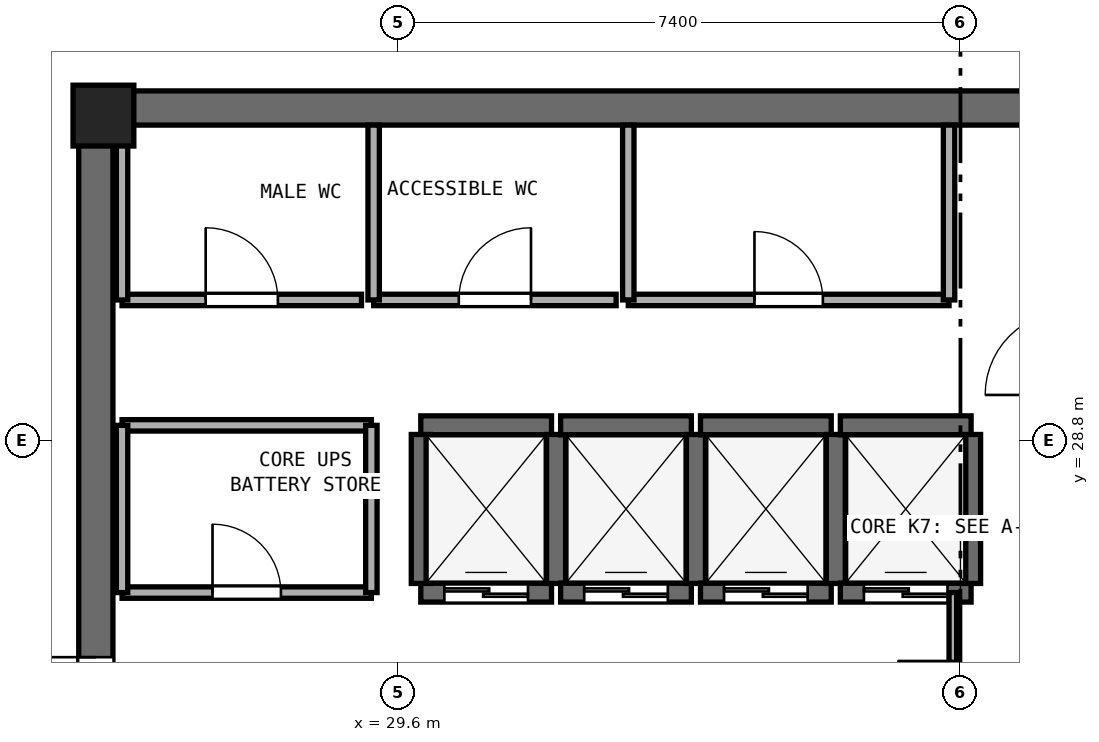
"""IFC4 building model, lengths in metres.
Left out: names, types, materials, properties, quantities, classifications, styles, units other than length and angle.
Written with IfcOpenShell. Run it as: python <this file> out.ifc"""

import sys

from ifc_helpers import new_model, si_unit, direction, frame, frame_2d, origin, origin_2d, place, context, subcontext, project, spatial, rectangle, extrude, element, fill, save


model = new_model("IFC4")
c1 = context("Model", 3, precision=1e-05, world=origin(), true_north=direction((0.0, 1.0)))
c2 = subcontext(c1, "Body", "Model", "MODEL_VIEW")
j1 = project(units=[si_unit("LENGTHUNIT", "METRE"), si_unit("PLANEANGLEUNIT", "RADIAN")], contexts=[c1])
p1 = place(None, origin())
s1 = spatial("IfcSite", under=j1, at=p1, CompositionType="ELEMENT")
p2 = place(p1, origin())
s2 = spatial("IfcBuilding", under=s1, at=p2, CompositionType="ELEMENT")
p3 = place(p2, frame((0.0, 0.0, 285.8)))
s3 = spatial("IfcBuildingStorey", under=s2, at=p3, CompositionType="ELEMENT", Elevation=285.8)
p4 = place(p3, frame((25.4, 33.175, 0.0), z_axis=(0.0, 0.0, 1.0), x_axis=(1.0, 0.0, 0.0)))
e1 = element("IfcWall", 1, at=p4, inside=s3, PredefinedType="SHEAR", context=c2, shape_type="SweptSolid", body=[
    extrude(rectangle(XDim=23.2, YDim=0.45, at=frame_2d((11.6, 0.0))), origin(), (0.0, 0.0, 1.0), 3.54),
])
p5 = place(p3, frame((25.625, 17.45, 0.0), z_axis=(0.0, 0.0, 1.0), x_axis=(0.0, 1.0, 0.0)))
e2 = element("IfcWall", 2, at=p5, inside=s3, PredefinedType="SHEAR", context=c2, shape_type="SweptSolid", body=[
    extrude(rectangle(XDim=15.5, YDim=0.45, at=frame_2d((7.75, 0.0))), origin(), (0.0, 0.0, 1.0), 3.54),
])
p6 = place(p5, frame((7.0, 0.0, 0.0)))
e3 = element("IfcOpeningElement", 3, at=p6, cuts=e2, PredefinedType="OPENING", context=c2, shape_type="SweptSolid", body=[
    extrude(rectangle(XDim=1.5, YDim=2.15, at=frame_2d((0.75, 1.075))), frame((0.0, 0.235, 0.0), z_axis=(0.0, -1.0, 0.0), x_axis=(1.0, 0.0, 0.0)), (0.0, 0.0, 1.0), 0.47),
])
p7 = place(p3, frame((25.725, 33.075, 0.0), z_axis=(0.0, 0.0, 1.0), x_axis=(1.0, 0.0, 0.0)))
e4 = element("IfcColumn", 4, at=p7, inside=s3, PredefinedType="PILASTER", context=c2, shape_type="SweptSolid", body=[
    extrude(rectangle(XDim=0.8, YDim=0.8, at=origin_2d()), origin(), (0.0, 0.0, 1.0), 3.8),
])
p8 = place(p3, frame((29.9, 26.8, 0.0), z_axis=(0.0, 0.0, 1.0), x_axis=(1.0, 0.0, 0.0)))
e5 = element("IfcWall", 5, at=p8, inside=s3, PredefinedType="SHEAR", context=c2, shape_type="SweptSolid", body=[
    extrude(rectangle(XDim=1.72, YDim=0.25, at=frame_2d((0.86, 0.0))), origin(), (0.0, 0.0, 1.0), 3.54),
])
p9 = place(p8, frame((0.31, 0.0, 0.0)))
e6 = element("IfcOpeningElement", 6, at=p9, cuts=e5, PredefinedType="OPENING", context=c2, shape_type="SweptSolid", body=[
    extrude(rectangle(XDim=1.1, YDim=2.15, at=frame_2d((0.55, 1.075))), frame((0.0, 0.135, 0.0), z_axis=(0.0, -1.0, 0.0), x_axis=(1.0, 0.0, 0.0)), (0.0, 0.0, 1.0), 0.27),
])
p10 = place(p3, frame((29.9, 29.0, 0.0), z_axis=(0.0, 0.0, 1.0), x_axis=(1.0, 0.0, 0.0)))
e7 = element("IfcWall", 7, at=p10, inside=s3, PredefinedType="SHEAR", context=c2, shape_type="SweptSolid", body=[
    extrude(rectangle(XDim=1.72, YDim=0.25, at=frame_2d((0.86, 0.0))), origin(), (0.0, 0.0, 1.0), 3.54),
])
for number, where, z_axis, x_axis in (
    (8, (29.9, 26.92, 0.0), (0.0, 0.0, 1.0), (0.0, 1.0, 0.0)),
    (9, (31.68, 26.92, 0.0), (0.0, 0.0, 1.0), (0.0, 1.0, 0.0)),
):
    element("IfcWall", number, at=place(p3, frame(where, z_axis=z_axis, x_axis=x_axis)), inside=s3, PredefinedType="SHEAR", context=c2, shape_type="SweptSolid", body=[
        extrude(rectangle(XDim=1.96, YDim=0.25, at=frame_2d((0.98, 0.0))), origin(), (0.0, 0.0, 1.0), 3.54),
    ])
p11 = place(p3, frame((31.74, 26.8, 0.0), z_axis=(0.0, 0.0, 1.0), x_axis=(1.0, 0.0, 0.0)))
e10 = element("IfcWall", 10, at=p11, inside=s3, PredefinedType="SHEAR", context=c2, shape_type="SweptSolid", body=[
    extrude(rectangle(XDim=1.72, YDim=0.25, at=frame_2d((0.86, 0.0))), origin(), (0.0, 0.0, 1.0), 3.54),
])
p12 = place(p11, frame((0.31, 0.0, 0.0)))
e11 = element("IfcOpeningElement", 11, at=p12, cuts=e10, PredefinedType="OPENING", context=c2, shape_type="SweptSolid", body=[
    extrude(rectangle(XDim=1.1, YDim=2.15, at=frame_2d((0.55, 1.075))), frame((0.0, 0.135, 0.0), z_axis=(0.0, -1.0, 0.0), x_axis=(1.0, 0.0, 0.0)), (0.0, 0.0, 1.0), 0.27),
])
p13 = place(p3, frame((31.74, 29.0, 0.0), z_axis=(0.0, 0.0, 1.0), x_axis=(1.0, 0.0, 0.0)))
e12 = element("IfcWall", 12, at=p13, inside=s3, PredefinedType="SHEAR", context=c2, shape_type="SweptSolid", body=[
    extrude(rectangle(XDim=1.72, YDim=0.25, at=frame_2d((0.86, 0.0))), origin(), (0.0, 0.0, 1.0), 3.54),
])
p14 = place(p3, frame((33.52, 26.92, 0.0), z_axis=(0.0, 0.0, 1.0), x_axis=(0.0, 1.0, 0.0)))
e13 = element("IfcWall", 13, at=p14, inside=s3, PredefinedType="SHEAR", context=c2, shape_type="SweptSolid", body=[
    extrude(rectangle(XDim=1.96, YDim=0.25, at=frame_2d((0.98, 0.0))), origin(), (0.0, 0.0, 1.0), 3.54),
])
p15 = place(p3, frame((33.58, 26.8, 0.0), z_axis=(0.0, 0.0, 1.0), x_axis=(1.0, 0.0, 0.0)))
e14 = element("IfcWall", 14, at=p15, inside=s3, PredefinedType="SHEAR", context=c2, shape_type="SweptSolid", body=[
    extrude(rectangle(XDim=1.72, YDim=0.25, at=frame_2d((0.86, 0.0))), origin(), (0.0, 0.0, 1.0), 3.54),
])
p16 = place(p15, frame((0.31, 0.0, 0.0)))
e15 = element("IfcOpeningElement", 15, at=p16, cuts=e14, PredefinedType="OPENING", context=c2, shape_type="SweptSolid", body=[
    extrude(rectangle(XDim=1.1, YDim=2.15, at=frame_2d((0.55, 1.075))), frame((0.0, 0.135, 0.0), z_axis=(0.0, -1.0, 0.0), x_axis=(1.0, 0.0, 0.0)), (0.0, 0.0, 1.0), 0.27),
])
p17 = place(p3, frame((33.58, 29.0, 0.0), z_axis=(0.0, 0.0, 1.0), x_axis=(1.0, 0.0, 0.0)))
e16 = element("IfcWall", 16, at=p17, inside=s3, PredefinedType="SHEAR", context=c2, shape_type="SweptSolid", body=[
    extrude(rectangle(XDim=1.72, YDim=0.25, at=frame_2d((0.86, 0.0))), origin(), (0.0, 0.0, 1.0), 3.54),
])
p18 = place(p3, frame((35.36, 26.92, 0.0), z_axis=(0.0, 0.0, 1.0), x_axis=(0.0, 1.0, 0.0)))
e17 = element("IfcWall", 17, at=p18, inside=s3, PredefinedType="SHEAR", context=c2, shape_type="SweptSolid", body=[
    extrude(rectangle(XDim=1.96, YDim=0.25, at=frame_2d((0.98, 0.0))), origin(), (0.0, 0.0, 1.0), 3.54),
])
p19 = place(p3, frame((35.42, 26.8, 0.0), z_axis=(0.0, 0.0, 1.0), x_axis=(1.0, 0.0, 0.0)))
e18 = element("IfcWall", 18, at=p19, inside=s3, PredefinedType="SHEAR", context=c2, shape_type="SweptSolid", body=[
    extrude(rectangle(XDim=1.72, YDim=0.25, at=frame_2d((0.86, 0.0))), origin(), (0.0, 0.0, 1.0), 3.54),
])
p20 = place(p19, frame((0.31, 0.0, 0.0)))
e19 = element("IfcOpeningElement", 19, at=p20, cuts=e18, PredefinedType="OPENING", context=c2, shape_type="SweptSolid", body=[
    extrude(rectangle(XDim=1.1, YDim=2.15, at=frame_2d((0.55, 1.075))), frame((0.0, 0.135, 0.0), z_axis=(0.0, -1.0, 0.0), x_axis=(1.0, 0.0, 0.0)), (0.0, 0.0, 1.0), 0.27),
])
p21 = place(p3, frame((35.42, 29.0, 0.0), z_axis=(0.0, 0.0, 1.0), x_axis=(1.0, 0.0, 0.0)))
e20 = element("IfcWall", 20, at=p21, inside=s3, PredefinedType="SHEAR", context=c2, shape_type="SweptSolid", body=[
    extrude(rectangle(XDim=1.72, YDim=0.25, at=frame_2d((0.86, 0.0))), origin(), (0.0, 0.0, 1.0), 3.54),
])
p22 = place(p3, frame((37.14, 26.92, 0.0), z_axis=(0.0, 0.0, 1.0), x_axis=(0.0, 1.0, 0.0)))
e21 = element("IfcWall", 21, at=p22, inside=s3, PredefinedType="SHEAR", context=c2, shape_type="SweptSolid", body=[
    extrude(rectangle(XDim=1.96, YDim=0.25, at=frame_2d((0.98, 0.0))), origin(), (0.0, 0.0, 1.0), 3.54),
])
p23 = place(p3, frame((25.97, 30.65, 0.0), z_axis=(0.0, 0.0, 1.0), x_axis=(1.0, 0.0, 0.0)))
e22 = element("IfcWall", 22, at=p23, inside=s3, PredefinedType="PARTITIONING", context=c2, shape_type="SweptSolid", body=[
    extrude(rectangle(XDim=3.15, YDim=0.15, at=frame_2d((1.575, 0.0))), origin(), (0.0, 0.0, 1.0), 3.54),
])
p24 = place(p23, frame((1.1, 0.0, 0.0)))
e23 = element("IfcOpeningElement", 23, at=p24, cuts=e22, PredefinedType="OPENING", context=c2, shape_type="SweptSolid", body=[
    extrude(rectangle(XDim=0.95, YDim=2.1, at=frame_2d((0.475, 1.05))), frame((0.0, 0.085, 0.0), z_axis=(0.0, -1.0, 0.0), x_axis=(1.0, 0.0, 0.0)), (0.0, 0.0, 1.0), 0.17),
])
p25 = place(p3, frame((25.97, 30.65, 0.0), z_axis=(0.0, 0.0, 1.0), x_axis=(0.0, 1.0, 0.0)))
e24 = element("IfcWall", 24, at=p25, inside=s3, PredefinedType="PARTITIONING", context=c2, shape_type="SweptSolid", body=[
    extrude(rectangle(XDim=2.3, YDim=0.15, at=frame_2d((1.15, 0.0))), origin(), (0.0, 0.0, 1.0), 2.64),
])
p26 = place(p3, frame((29.28, 30.65, 0.0), z_axis=(0.0, 0.0, 1.0), x_axis=(1.0, 0.0, 0.0)))
e25 = element("IfcWall", 25, at=p26, inside=s3, PredefinedType="PARTITIONING", context=c2, shape_type="SweptSolid", body=[
    extrude(rectangle(XDim=3.19, YDim=0.15, at=frame_2d((1.595, 0.0))), origin(), (0.0, 0.0, 1.0), 3.54),
])
p27 = place(p26, frame((1.12, 0.0, 0.0)))
e26 = element("IfcOpeningElement", 26, at=p27, cuts=e25, PredefinedType="OPENING", context=c2, shape_type="SweptSolid", body=[
    extrude(rectangle(XDim=0.95, YDim=2.1, at=frame_2d((0.475, 1.05))), frame((0.0, 0.085, 0.0), z_axis=(0.0, -1.0, 0.0), x_axis=(1.0, 0.0, 0.0)), (0.0, 0.0, 1.0), 0.17),
])
p28 = place(p3, frame((29.28, 30.65, 0.0), z_axis=(0.0, 0.0, 1.0), x_axis=(0.0, 1.0, 0.0)))
e27 = element("IfcWall", 27, at=p28, inside=s3, PredefinedType="PARTITIONING", context=c2, shape_type="SweptSolid", body=[
    extrude(rectangle(XDim=2.3, YDim=0.15, at=frame_2d((1.15, 0.0))), origin(), (0.0, 0.0, 1.0), 3.54),
])
p29 = place(p3, frame((32.63, 30.65, 0.0), z_axis=(0.0, 0.0, 1.0), x_axis=(1.0, 0.0, 0.0)))
e28 = element("IfcWall", 28, at=p29, inside=s3, PredefinedType="PARTITIONING", context=c2, shape_type="SweptSolid", body=[
    extrude(rectangle(XDim=4.22, YDim=0.15, at=frame_2d((2.11, 0.0))), origin(), (0.0, 0.0, 1.0), 3.54),
])
p30 = place(p29, frame((1.66, 0.0, 0.0)))
e29 = element("IfcOpeningElement", 29, at=p30, cuts=e28, PredefinedType="OPENING", context=c2, shape_type="SweptSolid", body=[
    extrude(rectangle(XDim=0.9, YDim=2.1, at=frame_2d((0.45, 1.05))), frame((0.0, 0.085, 0.0), z_axis=(0.0, -1.0, 0.0), x_axis=(1.0, 0.0, 0.0)), (0.0, 0.0, 1.0), 0.17),
])
for number, where, z_axis, x_axis in (
    (30, (32.63, 30.65, 0.0), (0.0, 0.0, 1.0), (0.0, 1.0, 0.0)),
    (31, (36.85, 30.65, 0.0), (0.0, 0.0, 1.0), (0.0, 1.0, 0.0)),
):
    element("IfcWall", number, at=place(p3, frame(where, z_axis=z_axis, x_axis=x_axis)), inside=s3, PredefinedType="PARTITIONING", context=c2, shape_type="SweptSolid", body=[
        extrude(rectangle(XDim=2.3, YDim=0.15, at=frame_2d((1.15, 0.0))), origin(), (0.0, 0.0, 1.0), 3.54),
    ])
p31 = place(p3, frame((25.97, 26.8, 0.0), z_axis=(0.0, 0.0, 1.0), x_axis=(1.0, 0.0, 0.0)))
e32 = element("IfcWall", 32, at=p31, inside=s3, PredefinedType="PARTITIONING", context=c2, shape_type="SweptSolid", body=[
    extrude(rectangle(XDim=3.28, YDim=0.15, at=frame_2d((1.64, 0.0))), origin(), (0.0, 0.0, 1.0), 3.54),
])
p32 = place(p31, frame((1.19, 0.0, 0.0)))
e33 = element("IfcOpeningElement", 33, at=p32, cuts=e32, PredefinedType="OPENING", context=c2, shape_type="SweptSolid", body=[
    extrude(rectangle(XDim=0.9, YDim=2.1, at=frame_2d((0.45, 1.05))), frame((0.0, 0.085, 0.0), z_axis=(0.0, -1.0, 0.0), x_axis=(1.0, 0.0, 0.0)), (0.0, 0.0, 1.0), 0.17),
])
p33 = place(p3, frame((25.97, 29.0, 0.0), z_axis=(0.0, 0.0, 1.0), x_axis=(1.0, 0.0, 0.0)))
e34 = element("IfcWall", 34, at=p33, inside=s3, PredefinedType="PARTITIONING", context=c2, shape_type="SweptSolid", body=[
    extrude(rectangle(XDim=3.28, YDim=0.15, at=frame_2d((1.64, 0.0))), origin(), (0.0, 0.0, 1.0), 3.54),
])
p34 = place(p3, frame((25.97, 26.8, 0.0), z_axis=(0.0, 0.0, 1.0), x_axis=(0.0, 1.0, 0.0)))
e35 = element("IfcWall", 35, at=p34, inside=s3, PredefinedType="PARTITIONING", context=c2, shape_type="SweptSolid", body=[
    extrude(rectangle(XDim=2.2, YDim=0.15, at=frame_2d((1.1, 0.0))), origin(), (0.0, 0.0, 1.0), 2.64),
])
p35 = place(p3, frame((29.25, 26.8, 0.0), z_axis=(0.0, 0.0, 1.0), x_axis=(0.0, 1.0, 0.0)))
e36 = element("IfcWall", 36, at=p35, inside=s3, PredefinedType="PARTITIONING", context=c2, shape_type="SweptSolid", body=[
    extrude(rectangle(XDim=2.2, YDim=0.15, at=frame_2d((1.1, 0.0))), origin(), (0.0, 0.0, 1.0), 3.54),
])
p36 = place(p3, frame((36.9, 23.6, 0.0), z_axis=(0.0, 0.0, 1.0), x_axis=(0.0, 1.0, 0.0)))
e37 = element("IfcWall", 37, at=p36, inside=s3, PredefinedType="PARTITIONING", context=c2, shape_type="SweptSolid", body=[
    extrude(rectangle(XDim=3.2, YDim=0.1, at=frame_2d((1.6, 0.0))), origin(), (0.0, 0.0, 1.0), 3.54),
])
p37 = place(p36, frame((0.85, 0.0, 0.0)))
e38 = element("IfcOpeningElement", 38, at=p37, cuts=e37, PredefinedType="OPENING", context=c2, shape_type="SweptSolid", body=[
    extrude(rectangle(XDim=1.45, YDim=2.12, at=frame_2d((0.725, 1.06))), frame((0.0, 0.06, 0.0), z_axis=(0.0, -1.0, 0.0), x_axis=(1.0, 0.0, 0.0)), (0.0, 0.0, 1.0), 0.12),
])
p38 = place(p9, origin())
e39 = element("IfcDoor", 39, at=p38, inside=s3, OperationType="DOUBLE_DOOR_SLIDING", PredefinedType="DOOR", context=c2, shape_type="SweptSolid", body=[
    extrude(rectangle(XDim=1.1, YDim=2.15, at=frame_2d((0.55, 1.075))), frame((0.0, 0.025, 0.0), z_axis=(0.0, -1.0, 0.0), x_axis=(1.0, 0.0, 0.0)), (0.0, 0.0, 1.0), 0.05),
])
fill(e6, e39)
p39 = place(p12, origin())
e40 = element("IfcDoor", 40, at=p39, inside=s3, OperationType="DOUBLE_DOOR_SLIDING", PredefinedType="DOOR", context=c2, shape_type="SweptSolid", body=[
    extrude(rectangle(XDim=1.1, YDim=2.15, at=frame_2d((0.55, 1.075))), frame((0.0, 0.025, 0.0), z_axis=(0.0, -1.0, 0.0), x_axis=(1.0, 0.0, 0.0)), (0.0, 0.0, 1.0), 0.05),
])
fill(e11, e40)
p40 = place(p16, origin())
e41 = element("IfcDoor", 41, at=p40, inside=s3, OperationType="DOUBLE_DOOR_SLIDING", PredefinedType="DOOR", context=c2, shape_type="SweptSolid", body=[
    extrude(rectangle(XDim=1.1, YDim=2.15, at=frame_2d((0.55, 1.075))), frame((0.0, 0.025, 0.0), z_axis=(0.0, -1.0, 0.0), x_axis=(1.0, 0.0, 0.0)), (0.0, 0.0, 1.0), 0.05),
])
fill(e15, e41)
p41 = place(p20, origin())
e42 = element("IfcDoor", 42, at=p41, inside=s3, OperationType="DOUBLE_DOOR_SLIDING", PredefinedType="DOOR", context=c2, shape_type="SweptSolid", body=[
    extrude(rectangle(XDim=1.1, YDim=2.15, at=frame_2d((0.55, 1.075))), frame((0.0, 0.025, 0.0), z_axis=(0.0, -1.0, 0.0), x_axis=(1.0, 0.0, 0.0)), (0.0, 0.0, 1.0), 0.05),
])
fill(e19, e42)
p42 = place(p6, origin())
e43 = element("IfcDoor", 43, at=p42, inside=s3, OperationType="DOUBLE_DOOR_SINGLE_SWING", PredefinedType="DOOR", context=c2, shape_type="SweptSolid", body=[
    extrude(rectangle(XDim=1.5, YDim=2.15, at=frame_2d((0.75, 1.075))), frame((0.0, 0.025, 0.0), z_axis=(0.0, -1.0, 0.0), x_axis=(1.0, 0.0, 0.0)), (0.0, 0.0, 1.0), 0.05),
])
fill(e3, e43)
p43 = place(p24, origin())
e44 = element("IfcDoor", 44, at=p43, inside=s3, OperationType="SINGLE_SWING_LEFT", PredefinedType="DOOR", context=c2, shape_type="SweptSolid", body=[
    extrude(rectangle(XDim=0.95, YDim=2.1, at=frame_2d((0.475, 1.05))), frame((0.0, 0.025, 0.0), z_axis=(0.0, -1.0, 0.0), x_axis=(1.0, 0.0, 0.0)), (0.0, 0.0, 1.0), 0.05),
])
fill(e23, e44)
p44 = place(p27, origin())
e45 = element("IfcDoor", 45, at=p44, inside=s3, OperationType="SINGLE_SWING_RIGHT", PredefinedType="DOOR", context=c2, shape_type="SweptSolid", body=[
    extrude(rectangle(XDim=0.95, YDim=2.1, at=frame_2d((0.475, 1.05))), frame((0.0, 0.025, 0.0), z_axis=(0.0, -1.0, 0.0), x_axis=(1.0, 0.0, 0.0)), (0.0, 0.0, 1.0), 0.05),
])
fill(e26, e45)
p45 = place(p30, origin())
e46 = element("IfcDoor", 46, at=p45, inside=s3, OperationType="SINGLE_SWING_LEFT", PredefinedType="DOOR", context=c2, shape_type="SweptSolid", body=[
    extrude(rectangle(XDim=0.9, YDim=2.1, at=frame_2d((0.45, 1.05))), frame((0.0, 0.025, 0.0), z_axis=(0.0, -1.0, 0.0), x_axis=(1.0, 0.0, 0.0)), (0.0, 0.0, 1.0), 0.05),
])
fill(e29, e46)
p46 = place(p32, origin())
e47 = element("IfcDoor", 47, at=p46, inside=s3, OperationType="SINGLE_SWING_LEFT", PredefinedType="DOOR", context=c2, shape_type="SweptSolid", body=[
    extrude(rectangle(XDim=0.9, YDim=2.1, at=frame_2d((0.45, 1.05))), frame((0.0, 0.025, 0.0), z_axis=(0.0, -1.0, 0.0), x_axis=(1.0, 0.0, 0.0)), (0.0, 0.0, 1.0), 0.05),
])
fill(e33, e47)
p47 = place(p37, origin())
e48 = element("IfcDoor", 48, at=p47, inside=s3, OperationType="DOUBLE_DOOR_SINGLE_SWING", PredefinedType="DOOR", context=c2, shape_type="SweptSolid", body=[
    extrude(rectangle(XDim=1.45, YDim=2.12, at=frame_2d((0.725, 1.06))), frame((0.0, 0.025, 0.0), z_axis=(0.0, -1.0, 0.0), x_axis=(1.0, 0.0, 0.0)), (0.0, 0.0, 1.0), 0.05),
])
fill(e38, e48)
save(model, sys.argv[1])
